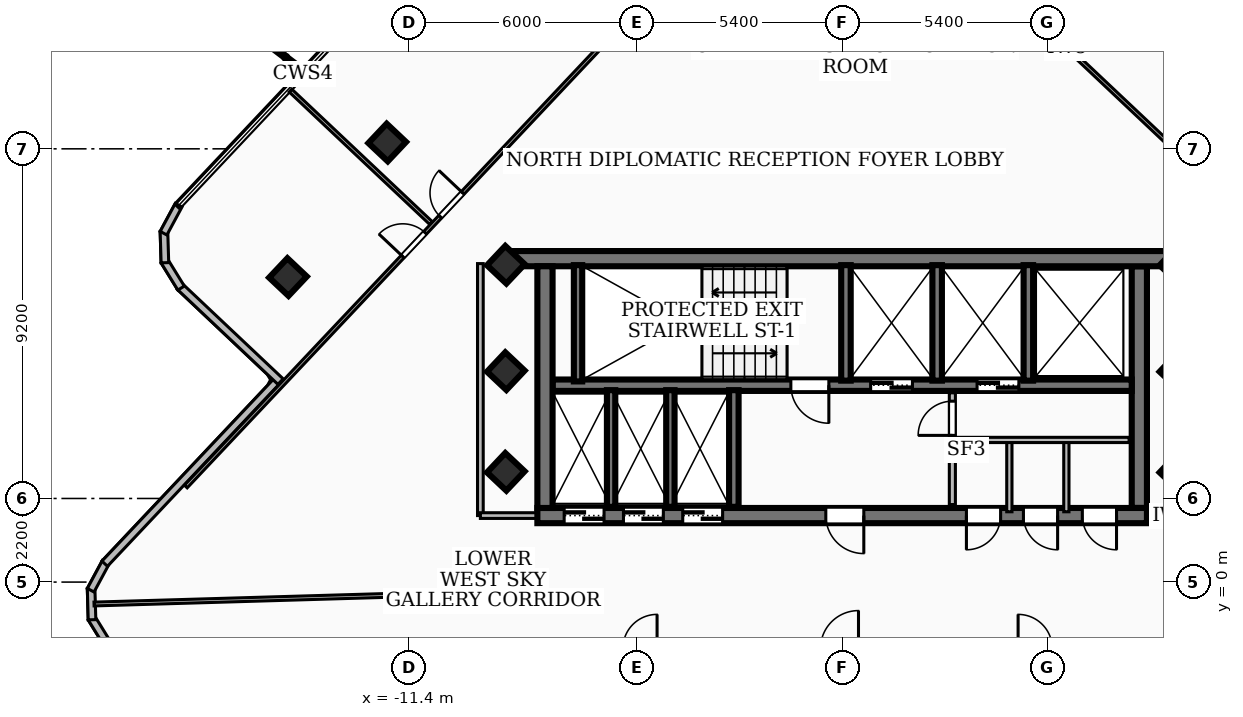
"""IFC4 building model, lengths in metres.
Left out: names, types, materials, properties, quantities, classifications, styles, units other than length and angle.
Written with IfcOpenShell. Run it as: python <this file> out.ifc"""

import sys

from ifc_helpers import new_model, si_unit, direction, frame, frame_2d, origin, origin_2d, place, context, subcontext, project, spatial, rectangle, extrude, element, fill, save


model = new_model("IFC4")
c1 = context("Model", 3, precision=1e-05, world=origin(), true_north=direction((0.0, 1.0)))
c2 = subcontext(c1, "Body", "Model", "MODEL_VIEW")
j1 = project(units=[si_unit("LENGTHUNIT", "METRE"), si_unit("PLANEANGLEUNIT", "RADIAN")], contexts=[c1])
p1 = place(None, origin())
s1 = spatial("IfcSite", under=j1, at=p1, CompositionType="ELEMENT")
p2 = place(p1, origin())
s2 = spatial("IfcBuilding", under=s1, at=p2, CompositionType="ELEMENT")
p3 = place(p2, frame((0.0, 0.0, 247.5)))
s3 = spatial("IfcBuildingStorey", under=s2, at=p3, CompositionType="ELEMENT", Elevation=247.5)
p4 = place(p3, frame((-8.78, 8.51, 0.0), z_axis=(0.0, 0.0, 1.0), x_axis=(1.0, 0.0, 0.0)))
e1 = element("IfcWall", 1, at=p4, inside=s3, PredefinedType="SHEAR", context=c2, shape_type="SweptSolid", body=[
    extrude(rectangle(XDim=17.56, YDim=0.4, at=frame_2d((8.78, 0.0))), origin(), (0.0, 0.0, 1.0), 3.16),
])
p5 = place(p3, frame((8.02, 1.75, 0.0), z_axis=(0.0, 0.0, 1.0), x_axis=(-1.0, 0.0, 0.0)))
e2 = element("IfcWall", 2, at=p5, inside=s3, PredefinedType="SHEAR", context=c2, shape_type="SweptSolid", body=[
    extrude(rectangle(XDim=16.04, YDim=0.4, at=frame_2d((8.02, 0.0))), origin(), (0.0, 0.0, 1.0), 3.16),
])
p6 = place(p5, frame((7.45, 0.0, 0.0)))
e3 = element("IfcOpeningElement", 3, at=p6, cuts=e2, PredefinedType="OPENING", context=c2, shape_type="SweptSolid", body=[
    extrude(rectangle(XDim=1.0, YDim=2.1, at=frame_2d((0.5, 1.05))), frame((0.0, 0.21, 0.0), z_axis=(0.0, -1.0, 0.0), x_axis=(1.0, 0.0, 0.0)), (0.0, 0.0, 1.0), 0.42),
])
p7 = place(p5, frame((14.285, 0.0, 0.0)))
e4 = element("IfcOpeningElement", 4, at=p7, cuts=e2, PredefinedType="OPENING", context=c2, shape_type="SweptSolid", body=[
    extrude(rectangle(XDim=1.05, YDim=2.15, at=frame_2d((0.525, 1.075))), frame((0.0, 0.21, 0.0), z_axis=(0.0, -1.0, 0.0), x_axis=(1.0, 0.0, 0.0)), (0.0, 0.0, 1.0), 0.42),
])
p8 = place(p5, frame((12.725, 0.0, 0.0)))
e5 = element("IfcOpeningElement", 5, at=p8, cuts=e2, PredefinedType="OPENING", context=c2, shape_type="SweptSolid", body=[
    extrude(rectangle(XDim=1.05, YDim=2.15, at=frame_2d((0.525, 1.075))), frame((0.0, 0.21, 0.0), z_axis=(0.0, -1.0, 0.0), x_axis=(1.0, 0.0, 0.0)), (0.0, 0.0, 1.0), 0.42),
])
p9 = place(p5, frame((11.165, 0.0, 0.0)))
e6 = element("IfcOpeningElement", 6, at=p9, cuts=e2, PredefinedType="OPENING", context=c2, shape_type="SweptSolid", body=[
    extrude(rectangle(XDim=1.05, YDim=2.15, at=frame_2d((0.525, 1.075))), frame((0.0, 0.21, 0.0), z_axis=(0.0, -1.0, 0.0), x_axis=(1.0, 0.0, 0.0)), (0.0, 0.0, 1.0), 0.42),
])
p10 = place(p5, frame((3.85, 0.0, 0.0)))
e7 = element("IfcOpeningElement", 7, at=p10, cuts=e2, PredefinedType="OPENING", context=c2, shape_type="SweptSolid", body=[
    extrude(rectangle(XDim=0.9, YDim=2.06, at=frame_2d((0.45, 1.03))), frame((0.0, 0.21, 0.0), z_axis=(0.0, -1.0, 0.0), x_axis=(1.0, 0.0, 0.0)), (0.0, 0.0, 1.0), 0.42),
])
p11 = place(p5, frame((2.35, 0.0, 0.0)))
e8 = element("IfcOpeningElement", 8, at=p11, cuts=e2, PredefinedType="OPENING", context=c2, shape_type="SweptSolid", body=[
    extrude(rectangle(XDim=0.9, YDim=2.06, at=frame_2d((0.45, 1.03))), frame((0.0, 0.21, 0.0), z_axis=(0.0, -1.0, 0.0), x_axis=(1.0, 0.0, 0.0)), (0.0, 0.0, 1.0), 0.42),
])
p12 = place(p5, frame((0.8, 0.0, 0.0)))
e9 = element("IfcOpeningElement", 9, at=p12, cuts=e2, PredefinedType="OPENING", context=c2, shape_type="SweptSolid", body=[
    extrude(rectangle(XDim=0.9, YDim=2.06, at=frame_2d((0.45, 1.03))), frame((0.0, 0.21, 0.0), z_axis=(0.0, -1.0, 0.0), x_axis=(1.0, 0.0, 0.0)), (0.0, 0.0, 1.0), 0.42),
])
for number, where, z_axis, x_axis in (
    (10, (-7.82, 1.95, 0.0), (0.0, 0.0, 1.0), (0.0, 1.0, 0.0)),
    (11, (7.82, 8.31, 0.0), (0.0, 0.0, 1.0), (0.0, -1.0, 0.0)),
):
    element("IfcWall", number, at=place(p3, frame(where, z_axis=z_axis, x_axis=x_axis)), inside=s3, PredefinedType="SHEAR", context=c2, shape_type="SweptSolid", body=[
        extrude(rectangle(XDim=6.36, YDim=0.4, at=frame_2d((3.18, 0.0))), origin(), (0.0, 0.0, 1.0), 3.16),
    ])
p13 = place(p3, frame((7.62, 5.18, 0.0), z_axis=(0.0, 0.0, 1.0), x_axis=(-1.0, 0.0, 0.0)))
e12 = element("IfcWall", 12, at=p13, inside=s3, PredefinedType="SOLIDWALL", context=c2, shape_type="SweptSolid", body=[
    extrude(rectangle(XDim=15.24, YDim=0.3, at=frame_2d((7.62, 0.0))), origin(), (0.0, 0.0, 1.0), 3.16),
])
p14 = place(p13, frame((5.77, 0.0, 0.0)))
e13 = element("IfcOpeningElement", 13, at=p14, cuts=e12, PredefinedType="OPENING", context=c2, shape_type="SweptSolid", body=[
    extrude(rectangle(XDim=1.1, YDim=2.15, at=frame_2d((0.55, 1.075))), frame((0.0, 0.16, 0.0), z_axis=(0.0, -1.0, 0.0), x_axis=(1.0, 0.0, 0.0)), (0.0, 0.0, 1.0), 0.32),
])
p15 = place(p13, frame((2.97, 0.0, 0.0)))
e14 = element("IfcOpeningElement", 14, at=p15, cuts=e12, PredefinedType="OPENING", context=c2, shape_type="SweptSolid", body=[
    extrude(rectangle(XDim=1.1, YDim=2.15, at=frame_2d((0.55, 1.075))), frame((0.0, 0.16, 0.0), z_axis=(0.0, -1.0, 0.0), x_axis=(1.0, 0.0, 0.0)), (0.0, 0.0, 1.0), 0.32),
])
p16 = place(p13, frame((7.97, 0.0, 0.0)))
e15 = element("IfcOpeningElement", 15, at=p16, cuts=e12, PredefinedType="OPENING", context=c2, shape_type="SweptSolid", body=[
    extrude(rectangle(XDim=1.0, YDim=2.1, at=frame_2d((0.5, 1.05))), frame((0.0, 0.16, 0.0), z_axis=(0.0, -1.0, 0.0), x_axis=(1.0, 0.0, 0.0)), (0.0, 0.0, 1.0), 0.32),
])
p17 = place(p3, frame((-6.95, 5.28, 0.0), z_axis=(0.0, 0.0, 1.0), x_axis=(0.0, 1.0, 0.0)))
e16 = element("IfcWall", 16, at=p17, inside=s3, PredefinedType="SOLIDWALL", context=c2, shape_type="SweptSolid", body=[
    extrude(rectangle(XDim=3.06, YDim=0.22, at=frame_2d((1.53, 0.0))), origin(), (0.0, 0.0, 1.0), 3.16),
])
for number, where, z_axis, x_axis in (
    (17, (0.1, 5.3, 0.0), (0.0, 0.0, 1.0), (0.0, 1.0, 0.0)),
    (18, (2.5, 5.3, 0.0), (0.0, 0.0, 1.0), (0.0, 1.0, 0.0)),
    (19, (4.9, 5.3, 0.0), (0.0, 0.0, 1.0), (0.0, 1.0, 0.0)),
):
    element("IfcWall", number, at=place(p3, frame(where, z_axis=z_axis, x_axis=x_axis)), inside=s3, PredefinedType="SOLIDWALL", context=c2, shape_type="SweptSolid", body=[
        extrude(rectangle(XDim=3.04, YDim=0.25, at=frame_2d((1.52, 0.0))), origin(), (0.0, 0.0, 1.0), 3.16),
    ])
p18 = place(p3, frame((-2.85, 1.98, 0.0), z_axis=(0.0, 0.0, 1.0), x_axis=(0.0, 1.0, 0.0)))
e20 = element("IfcWall", 20, at=p18, inside=s3, PredefinedType="SOLIDWALL", context=c2, shape_type="SweptSolid", body=[
    extrude(rectangle(XDim=3.07, YDim=0.25, at=frame_2d((1.535, 0.0))), origin(), (0.0, 0.0, 1.0), 3.16),
])
for number, where, z_axis, x_axis in (
    (21, (-6.08, 1.98, 0.0), (0.0, 0.0, 1.0), (0.0, 1.0, 0.0)),
    (22, (-4.52, 1.98, 0.0), (0.0, 0.0, 1.0), (0.0, 1.0, 0.0)),
):
    element("IfcWall", number, at=place(p3, frame(where, z_axis=z_axis, x_axis=x_axis)), inside=s3, PredefinedType="SOLIDWALL", context=c2, shape_type="SweptSolid", body=[
        extrude(rectangle(XDim=3.07, YDim=0.22, at=frame_2d((1.535, 0.0))), origin(), (0.0, 0.0, 1.0), 3.16),
    ])
for number, where, z_axis, x_axis in (
    (23, (-8.85, 2.9, 0.0), (0.0, 0.0, 1.0), (0.686, 0.728, 0.0)),
    (24, (-8.85, 5.55, 0.0), (0.0, 0.0, 1.0), (0.686, 0.728, 0.0)),
    (25, (8.85, 2.9, 0.0), (0.0, 0.0, 1.0), (0.686, 0.728, 0.0)),
    (26, (8.85, 5.55, 0.0), (0.0, 0.0, 1.0), (0.686, 0.728, 0.0)),
    (27, (-8.85, 8.35, 0.0), (0.0, 0.0, 1.0), (0.686, 0.728, 0.0)),
    (28, (8.85, 8.35, 0.0), (0.0, 0.0, 1.0), (0.686, 0.728, 0.0)),
    (29, (-11.971, 11.566, 0.0), (0.0, 0.0, 1.0), (0.686, 0.728, 0.0)),
    (30, (-14.583, 8.026, 0.0), (0.0, 0.0, 1.0), (0.686, 0.728, 0.0)),
):
    element("IfcColumn", number, at=place(p3, frame(where, z_axis=z_axis, x_axis=x_axis)), inside=s3, PredefinedType="COLUMN", context=c2, shape_type="SweptSolid", body=[
        extrude(rectangle(XDim=0.7, YDim=0.7, at=origin_2d()), origin(), (0.0, 0.0, 1.0), 3.42),
    ])
p19 = place(p3, frame((-19.313, -1.658, 0.0), z_axis=(0.0, 0.0, 1.0), x_axis=(-0.52517019965, 0.850997215859, 0.0)))
e31 = element("IfcWall", 31, at=p19, inside=s3, PredefinedType="SOLIDWALL", context=c2, shape_type="SweptSolid", body=[
    extrude(rectangle(XDim=0.838, YDim=0.2, at=frame_2d((0.419, 0.0))), origin(), (0.0, 0.0, 1.0), 3.16),
])
p20 = place(p3, frame((-19.739, -0.991, 0.0), z_axis=(0.0, 0.0, 1.0), x_axis=(-0.029024803491, 0.999578691641, 0.0)))
e32 = element("IfcWall", 32, at=p20, inside=s3, PredefinedType="SOLIDWALL", context=c2, shape_type="SweptSolid", body=[
    extrude(rectangle(XDim=0.824, YDim=0.2, at=frame_2d((0.412, 0.0))), origin(), (0.0, 0.0, 1.0), 3.16),
])
p21 = place(p3, frame((-19.774, -0.214, 0.0), z_axis=(0.0, 0.0, 1.0), x_axis=(0.474603278561, 0.880199822755, 0.0)))
e33 = element("IfcWall", 33, at=p21, inside=s3, PredefinedType="SOLIDWALL", context=c2, shape_type="SweptSolid", body=[
    extrude(rectangle(XDim=0.838, YDim=0.2, at=frame_2d((0.419, 0.0))), origin(), (0.0, 0.0, 1.0), 3.16),
])
p22 = place(p3, frame((-19.405, 0.484, 0.0), z_axis=(0.0, 0.0, 1.0), x_axis=(0.686028756372, 0.727574426042, 0.0)))
e34 = element("IfcWall", 34, at=p22, inside=s3, PredefinedType="SOLIDWALL", context=c2, shape_type="SweptSolid", body=[
    extrude(rectangle(XDim=6.74, YDim=0.2, at=frame_2d((3.37, 0.0))), origin(), (0.0, 0.0, 1.0), 3.16),
])
p23 = place(p3, frame((-14.778, 5.275, 0.0), z_axis=(0.0, 0.0, 1.0), x_axis=(-0.727262285553, 0.686359649172, 0.0)))
e35 = element("IfcWall", 35, at=p23, inside=s3, PredefinedType="SOLIDWALL", context=c2, shape_type="SweptSolid", body=[
    extrude(rectangle(XDim=3.641, YDim=0.2, at=frame_2d((1.82, 0.0))), origin(), (0.0, 0.0, 1.0), 3.16),
])
p24 = place(p3, frame((-17.395, 7.736, 0.0), z_axis=(0.0, 0.0, 1.0), x_axis=(-0.52517019965, 0.850997215859, 0.0)))
e36 = element("IfcWall", 36, at=p24, inside=s3, PredefinedType="SOLIDWALL", context=c2, shape_type="SweptSolid", body=[
    extrude(rectangle(XDim=0.838, YDim=0.2, at=frame_2d((0.419, 0.0))), origin(), (0.0, 0.0, 1.0), 3.16),
])
p25 = place(p3, frame((-17.821, 8.403, 0.0), z_axis=(0.0, 0.0, 1.0), x_axis=(-0.030208429442, 0.999543621255, 0.0)))
e37 = element("IfcWall", 37, at=p25, inside=s3, PredefinedType="SOLIDWALL", context=c2, shape_type="SweptSolid", body=[
    extrude(rectangle(XDim=0.824, YDim=0.2, at=frame_2d((0.412, 0.0))), origin(), (0.0, 0.0, 1.0), 3.16),
])
p26 = place(p3, frame((-17.857, 9.18, 0.0), z_axis=(0.0, 0.0, 1.0), x_axis=(0.474603278561, 0.880199822755, 0.0)))
e38 = element("IfcWall", 38, at=p26, inside=s3, PredefinedType="SOLIDWALL", context=c2, shape_type="SweptSolid", body=[
    extrude(rectangle(XDim=0.838, YDim=0.2, at=frame_2d((0.419, 0.0))), origin(), (0.0, 0.0, 1.0), 3.16),
])
p27 = place(p3, frame((2.9, 2.04, 0.0), z_axis=(0.0, 0.0, 1.0), x_axis=(0.0, 1.0, 0.0)))
e39 = element("IfcWall", 39, at=p27, inside=s3, PredefinedType="PARTITIONING", context=c2, shape_type="SweptSolid", body=[
    extrude(rectangle(XDim=2.94, YDim=0.16, at=frame_2d((1.47, 0.0))), origin(), (0.0, 0.0, 1.0), 2.39),
])
p28 = place(p27, frame((1.82, 0.0, 0.0)))
e40 = element("IfcOpeningElement", 40, at=p28, cuts=e39, PredefinedType="OPENING", context=c2, shape_type="SweptSolid", body=[
    extrude(rectangle(XDim=0.9, YDim=2.06, at=frame_2d((0.45, 1.03))), frame((0.0, 0.09, 0.0), z_axis=(0.0, -1.0, 0.0), x_axis=(1.0, 0.0, 0.0)), (0.0, 0.0, 1.0), 0.18),
])
p29 = place(p3, frame((2.9, 3.74, 0.0), z_axis=(0.0, 0.0, 1.0), x_axis=(1.0, 0.0, 0.0)))
e41 = element("IfcWall", 41, at=p29, inside=s3, PredefinedType="PARTITIONING", context=c2, shape_type="SweptSolid", body=[
    extrude(rectangle(XDim=4.65, YDim=0.138, at=frame_2d((2.325, 0.0))), origin(), (0.0, 0.0, 1.0), 3.16),
])
for number, where, z_axis, x_axis in (
    (42, (4.4, 1.85, 0.0), (0.0, 0.0, 1.0), (0.0, 1.0, 0.0)),
    (43, (5.9, 1.85, 0.0), (0.0, 0.0, 1.0), (0.0, 1.0, 0.0)),
):
    element("IfcWall", number, at=place(p3, frame(where, z_axis=z_axis, x_axis=x_axis)), inside=s3, PredefinedType="PARTITIONING", context=c2, shape_type="SweptSolid", body=[
        extrude(rectangle(XDim=1.89, YDim=0.138, at=frame_2d((0.945, 0.0))), origin(), (0.0, 0.0, 1.0), 2.39),
    ])
p30 = place(p3, frame((-9.52, 1.75, 0.0), z_axis=(0.0, 0.0, 1.0), x_axis=(0.0, 1.0, 0.0)))
e44 = element("IfcWall", 44, at=p30, inside=s3, PredefinedType="PARTITIONING", context=c2, shape_type="SweptSolid", body=[
    extrude(rectangle(XDim=6.63, YDim=0.15, at=frame_2d((3.315, 0.0))), origin(), (0.0, 0.0, 1.0), 2.53),
])
for number, where, z_axis, x_axis in (
    (45, (-7.85, 1.75, 0.0), (0.0, 0.0, 1.0), (-1.0, 0.0, 0.0)),
    (46, (7.85, 1.75, 0.0), (0.0, 0.0, 1.0), (1.0, 0.0, 0.0)),
):
    element("IfcWall", number, at=place(p3, frame(where, z_axis=z_axis, x_axis=x_axis)), inside=s3, PredefinedType="PARTITIONING", context=c2, shape_type="SweptSolid", body=[
        extrude(rectangle(XDim=1.67, YDim=0.15, at=frame_2d((0.835, 0.0))), origin(), (0.0, 0.0, 1.0), 2.39),
    ])
p31 = place(p3, frame((-0.397, 13.54, 0.0), z_axis=(0.0, 0.0, 1.0), x_axis=(-0.029263699144, 0.999571726247, 0.0)))
e47 = element("IfcWall", 47, at=p31, inside=s3, PredefinedType="PARTITIONING", context=c2, shape_type="SweptSolid", body=[
    extrude(rectangle(XDim=6.149, YDim=0.1, at=frame_2d((3.074, 0.0))), origin(), (0.0, 0.0, 1.0), 3.16),
])
p32 = place(p3, frame((-11.395, -0.334, 0.0), z_axis=(0.0, 0.0, 1.0), x_axis=(-0.999571055306, -0.029286607775, 0.0)))
e48 = element("IfcWall", 48, at=p32, inside=s3, PredefinedType="PARTITIONING", context=c2, shape_type="SweptSolid", body=[
    extrude(rectangle(XDim=8.295, YDim=0.1, at=frame_2d((4.147, 0.0))), origin(), (0.0, 0.0, 1.0), 3.16),
])
p33 = place(p3, frame((8.807, 11.336, 0.0), z_axis=(0.0, 0.0, 1.0), x_axis=(-0.727546923281, 0.68605792352, 0.0)))
e49 = element("IfcWall", 49, at=p33, inside=s3, PredefinedType="PARTITIONING", context=c2, shape_type="SweptSolid", body=[
    extrude(rectangle(XDim=7.95, YDim=0.1, at=frame_2d((3.975, 0.0))), origin(), (0.0, 0.0, 1.0), 3.16),
])
p34 = place(p3, frame((6.75, 16.246, 0.0), z_axis=(0.0, 0.0, 1.0), x_axis=(0.727488049341, -0.686120352464, 0.0)))
e50 = element("IfcWall", 50, at=p34, inside=s3, PredefinedType="PARTITIONING", context=c2, shape_type="SweptSolid", body=[
    extrude(rectangle(XDim=12.47, YDim=0.1, at=frame_2d((6.235, 0.0))), origin(), (0.0, 0.0, 1.0), 2.53),
])
p35 = place(p34, frame((6.155, 0.0, 0.0)))
e51 = element("IfcOpeningElement", 51, at=p35, cuts=e50, PredefinedType="OPENING", context=c2, shape_type="SweptSolid", body=[
    extrude(rectangle(XDim=0.86, YDim=2.04, at=frame_2d((0.43, 1.02))), frame((0.0, 0.06, 0.0), z_axis=(0.0, -1.0, 0.0), x_axis=(1.0, 0.0, 0.0)), (0.0, 0.0, 1.0), 0.12),
])
p36 = place(p34, frame((4.955, 0.0, 0.0)))
e52 = element("IfcOpeningElement", 52, at=p36, cuts=e50, PredefinedType="OPENING", context=c2, shape_type="SweptSolid", body=[
    extrude(rectangle(XDim=0.86, YDim=2.04, at=frame_2d((0.43, 1.02))), frame((0.0, 0.06, 0.0), z_axis=(0.0, -1.0, 0.0), x_axis=(1.0, 0.0, 0.0)), (0.0, 0.0, 1.0), 0.12),
])
p37 = place(p3, frame((-10.817, 9.445, 0.0), z_axis=(0.0, 0.0, 1.0), x_axis=(-0.727564075469, 0.686039733606, 0.0)))
e53 = element("IfcWall", 53, at=p37, inside=s3, PredefinedType="PARTITIONING", context=c2, shape_type="SweptSolid", body=[
    extrude(rectangle(XDim=5.086, YDim=0.1, at=frame_2d((2.543, 0.0))), origin(), (0.0, 0.0, 1.0), 3.16),
])
p38 = place(p3, frame((-17.271, 2.514, 0.0), z_axis=(0.0, 0.0, 1.0), x_axis=(0.686068145865, 0.727537283739, 0.0)))
e54 = element("IfcWall", 54, at=p38, inside=s3, PredefinedType="PARTITIONING", context=c2, shape_type="SweptSolid", body=[
    extrude(rectangle(XDim=20.04, YDim=0.1, at=frame_2d((10.02, 0.0))), origin(), (0.0, 0.0, 1.0), 2.53),
])
p39 = place(p38, frame((9.76, 0.0, 0.0)))
e55 = element("IfcOpeningElement", 55, at=p39, cuts=e54, PredefinedType="OPENING", context=c2, shape_type="SweptSolid", body=[
    extrude(rectangle(XDim=0.86, YDim=2.04, at=frame_2d((0.43, 1.02))), frame((0.0, 0.06, 0.0), z_axis=(0.0, -1.0, 0.0), x_axis=(1.0, 0.0, 0.0)), (0.0, 0.0, 1.0), 0.12),
])
p40 = place(p38, frame((8.32, 0.0, 0.0)))
e56 = element("IfcOpeningElement", 56, at=p40, cuts=e54, PredefinedType="OPENING", context=c2, shape_type="SweptSolid", body=[
    extrude(rectangle(XDim=0.86, YDim=2.04, at=frame_2d((0.43, 1.02))), frame((0.0, 0.06, 0.0), z_axis=(0.0, -1.0, 0.0), x_axis=(1.0, 0.0, 0.0)), (0.0, 0.0, 1.0), 0.12),
])
p41 = place(p6, origin())
e57 = element("IfcDoor", 57, at=p41, inside=s3, OperationType="SINGLE_SWING_LEFT", PredefinedType="DOOR", context=c2, shape_type="SweptSolid", body=[
    extrude(rectangle(XDim=1.0, YDim=2.1, at=frame_2d((0.5, 1.05))), frame((0.0, 0.025, 0.0), z_axis=(0.0, -1.0, 0.0), x_axis=(1.0, 0.0, 0.0)), (0.0, 0.0, 1.0), 0.05),
])
fill(e3, e57)
p42 = place(p14, origin())
e58 = element("IfcDoor", 58, at=p42, inside=s3, OperationType="DOUBLE_DOOR_SLIDING", PredefinedType="DOOR", context=c2, shape_type="SweptSolid", body=[
    extrude(rectangle(XDim=1.1, YDim=2.15, at=frame_2d((0.55, 1.075))), frame((0.0, 0.025, 0.0), z_axis=(0.0, -1.0, 0.0), x_axis=(1.0, 0.0, 0.0)), (0.0, 0.0, 1.0), 0.05),
])
fill(e13, e58)
p43 = place(p15, origin())
e59 = element("IfcDoor", 59, at=p43, inside=s3, OperationType="DOUBLE_DOOR_SLIDING", PredefinedType="DOOR", context=c2, shape_type="SweptSolid", body=[
    extrude(rectangle(XDim=1.1, YDim=2.15, at=frame_2d((0.55, 1.075))), frame((0.0, 0.025, 0.0), z_axis=(0.0, -1.0, 0.0), x_axis=(1.0, 0.0, 0.0)), (0.0, 0.0, 1.0), 0.05),
])
fill(e14, e59)
p44 = place(p16, origin())
e60 = element("IfcDoor", 60, at=p44, inside=s3, OperationType="SINGLE_SWING_LEFT", PredefinedType="DOOR", context=c2, shape_type="SweptSolid", body=[
    extrude(rectangle(XDim=1.0, YDim=2.1, at=frame_2d((0.5, 1.05))), frame((0.0, 0.025, 0.0), z_axis=(0.0, -1.0, 0.0), x_axis=(1.0, 0.0, 0.0)), (0.0, 0.0, 1.0), 0.05),
])
fill(e15, e60)
p45 = place(p7, origin())
e61 = element("IfcDoor", 61, at=p45, inside=s3, OperationType="DOUBLE_DOOR_SLIDING", PredefinedType="DOOR", context=c2, shape_type="SweptSolid", body=[
    extrude(rectangle(XDim=1.05, YDim=2.15, at=frame_2d((0.525, 1.075))), frame((0.0, 0.025, 0.0), z_axis=(0.0, -1.0, 0.0), x_axis=(1.0, 0.0, 0.0)), (0.0, 0.0, 1.0), 0.05),
])
fill(e4, e61)
p46 = place(p8, origin())
e62 = element("IfcDoor", 62, at=p46, inside=s3, OperationType="DOUBLE_DOOR_SLIDING", PredefinedType="DOOR", context=c2, shape_type="SweptSolid", body=[
    extrude(rectangle(XDim=1.05, YDim=2.15, at=frame_2d((0.525, 1.075))), frame((0.0, 0.025, 0.0), z_axis=(0.0, -1.0, 0.0), x_axis=(1.0, 0.0, 0.0)), (0.0, 0.0, 1.0), 0.05),
])
fill(e5, e62)
p47 = place(p9, origin())
e63 = element("IfcDoor", 63, at=p47, inside=s3, OperationType="DOUBLE_DOOR_SLIDING", PredefinedType="DOOR", context=c2, shape_type="SweptSolid", body=[
    extrude(rectangle(XDim=1.05, YDim=2.15, at=frame_2d((0.525, 1.075))), frame((0.0, 0.025, 0.0), z_axis=(0.0, -1.0, 0.0), x_axis=(1.0, 0.0, 0.0)), (0.0, 0.0, 1.0), 0.05),
])
fill(e6, e63)
p48 = place(p10, origin())
e64 = element("IfcDoor", 64, at=p48, inside=s3, OperationType="SINGLE_SWING_RIGHT", PredefinedType="DOOR", context=c2, shape_type="SweptSolid", body=[
    extrude(rectangle(XDim=0.9, YDim=2.06, at=frame_2d((0.45, 1.03))), frame((0.0, 0.025, 0.0), z_axis=(0.0, -1.0, 0.0), x_axis=(1.0, 0.0, 0.0)), (0.0, 0.0, 1.0), 0.05),
])
fill(e7, e64)
p49 = place(p11, origin())
e65 = element("IfcDoor", 65, at=p49, inside=s3, OperationType="SINGLE_SWING_LEFT", PredefinedType="DOOR", context=c2, shape_type="SweptSolid", body=[
    extrude(rectangle(XDim=0.9, YDim=2.06, at=frame_2d((0.45, 1.03))), frame((0.0, 0.025, 0.0), z_axis=(0.0, -1.0, 0.0), x_axis=(1.0, 0.0, 0.0)), (0.0, 0.0, 1.0), 0.05),
])
fill(e8, e65)
p50 = place(p12, origin())
e66 = element("IfcDoor", 66, at=p50, inside=s3, OperationType="SINGLE_SWING_LEFT", PredefinedType="DOOR", context=c2, shape_type="SweptSolid", body=[
    extrude(rectangle(XDim=0.9, YDim=2.06, at=frame_2d((0.45, 1.03))), frame((0.0, 0.025, 0.0), z_axis=(0.0, -1.0, 0.0), x_axis=(1.0, 0.0, 0.0)), (0.0, 0.0, 1.0), 0.05),
])
fill(e9, e66)
p51 = place(p28, origin())
e67 = element("IfcDoor", 67, at=p51, inside=s3, OperationType="SINGLE_SWING_LEFT", PredefinedType="DOOR", context=c2, shape_type="SweptSolid", body=[
    extrude(rectangle(XDim=0.9, YDim=2.06, at=frame_2d((0.45, 1.03))), frame((0.0, 0.025, 0.0), z_axis=(0.0, -1.0, 0.0), x_axis=(1.0, 0.0, 0.0)), (0.0, 0.0, 1.0), 0.05),
])
fill(e40, e67)
p52 = place(p39, origin())
e68 = element("IfcDoor", 68, at=p52, inside=s3, OperationType="SINGLE_SWING_RIGHT", PredefinedType="DOOR", context=c2, shape_type="SweptSolid", body=[
    extrude(rectangle(XDim=0.86, YDim=2.04, at=frame_2d((0.43, 1.02))), frame((0.0, 0.025, 0.0), z_axis=(0.0, -1.0, 0.0), x_axis=(1.0, 0.0, 0.0)), (0.0, 0.0, 1.0), 0.05),
])
fill(e55, e68)
p53 = place(p40, origin())
e69 = element("IfcDoor", 69, at=p53, inside=s3, OperationType="SINGLE_SWING_LEFT", PredefinedType="DOOR", context=c2, shape_type="SweptSolid", body=[
    extrude(rectangle(XDim=0.86, YDim=2.04, at=frame_2d((0.43, 1.02))), frame((0.0, 0.025, 0.0), z_axis=(0.0, -1.0, 0.0), x_axis=(1.0, 0.0, 0.0)), (0.0, 0.0, 1.0), 0.05),
])
fill(e56, e69)
save(model, sys.argv[1])
